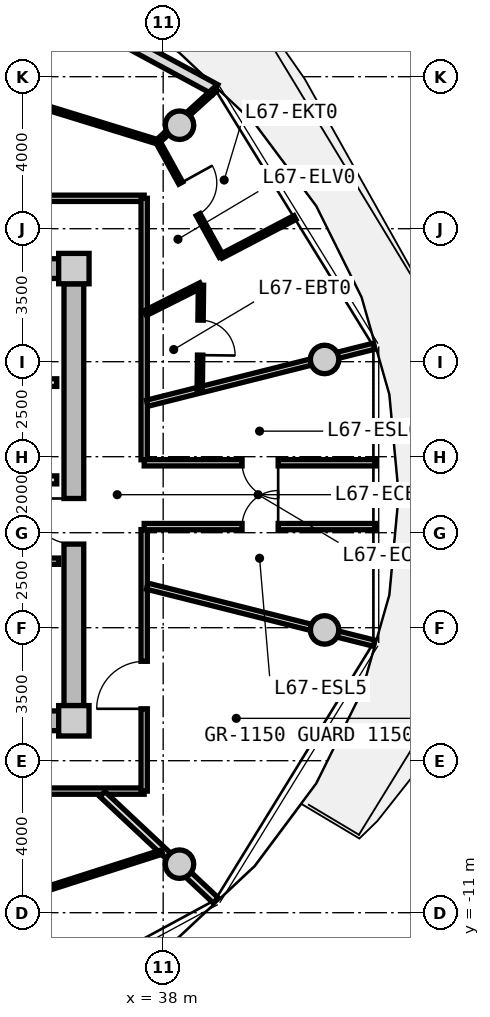
"""IFC4 building model, lengths in metres.
Left out: names, types, materials, properties, quantities, classifications, styles, units other than length and angle.
Written with IfcOpenShell. Run it as: python <this file> out.ifc"""

import sys

from ifc_helpers import new_model, si_unit, direction, frame, frame_2d, origin, origin_2d, place, context, subcontext, project, spatial, rectangle, circle, extrude, source, transform, mapped, element, fill, save


model = new_model("IFC4")
c1 = context("Model", 3, precision=1e-05, world=origin(), true_north=direction((0.0, 1.0)))
c2 = subcontext(c1, "Body", "Model", "MODEL_VIEW")
j1 = project(units=[si_unit("LENGTHUNIT", "METRE"), si_unit("PLANEANGLEUNIT", "RADIAN")], contexts=[c1])
p1 = place(None, origin())
s1 = spatial("IfcSite", under=j1, at=p1, CompositionType="ELEMENT")
p2 = place(p1, origin())
s2 = spatial("IfcBuilding", under=s1, at=p2, CompositionType="ELEMENT")
p3 = place(p2, frame((0.0, 0.0, 216.95)))
s3 = spatial("IfcBuildingStorey", under=s2, at=p3, CompositionType="ELEMENT", Elevation=216.95)
m1 = source(origin(), c2, "Body", "SweptSolid", [
    extrude(rectangle(XDim=0.8, YDim=0.8, at=origin_2d()), origin(), (0.0, 0.0, 1.0), 3.05),
])
for number, where, z_axis, x_axis in (
    (1, (35.65, -5.95, 0.0), (0.0, 0.0, 1.0), (1.0, 0.0, 0.0)),
    (2, (35.65, 5.95, 0.0), (0.0, 0.0, 1.0), (1.0, 0.0, 0.0)),
):
    element("IfcColumn", number, at=place(p3, frame(where, z_axis=z_axis, x_axis=x_axis)), inside=s3, PredefinedType="COLUMN", context=c2, shape_type="MappedRepresentation", body=[
        mapped(m1, transform((0.0, 0.0, 0.0), x_axis=(1.0, 0.0, 0.0), y_axis=(0.0, 1.0, 0.0), z_axis=(0.0, 0.0, 1.0), scale=1.0)),
    ])
m2 = source(origin(), c2, "Body", "SweptSolid", [
    extrude(rectangle(XDim=14.5, YDim=0.52, at=frame_2d((7.25, 0.0))), origin(), (0.0, 0.0, 1.0), 2.76),
])
for number, where, z_axis, x_axis in (
    (3, (20.75, 5.95, 0.0), (0.0, 0.0, 1.0), (1.0, 0.0, 0.0)),
    (4, (35.25, -5.95, 0.0), (0.0, 0.0, 1.0), (-1.0, 0.0, 0.0)),
):
    element("IfcWall", number, at=place(p3, frame(where, z_axis=z_axis, x_axis=x_axis)), inside=s3, PredefinedType="SHEAR", context=c2, shape_type="MappedRepresentation", body=[
        mapped(m2, transform((0.0, 0.0, 0.0), x_axis=(1.0, 0.0, 0.0), y_axis=(0.0, 1.0, 0.0), z_axis=(0.0, 0.0, 1.0), scale=1.0)),
    ])
m3 = source(origin(), c2, "Body", "SweptSolid", [
    extrude(rectangle(XDim=11.1, YDim=0.52, at=frame_2d((5.55, 0.0))), origin(), (0.0, 0.0, 1.0), 2.76),
])
p4 = place(p3, frame((35.65, 5.55, 0.0), z_axis=(0.0, 0.0, 1.0), x_axis=(0.0, -1.0, 0.0)))
e5 = element("IfcWall", 5, at=p4, inside=s3, PredefinedType="SHEAR", context=c2, shape_type="MappedRepresentation", body=[
    mapped(m3, transform((0.0, 0.0, 0.0), x_axis=(1.0, 0.0, 0.0), y_axis=(0.0, 1.0, 0.0), z_axis=(0.0, 0.0, 1.0), scale=1.0)),
])
p5 = place(p4, frame((5.65, 0.0, 0.0)))
e6 = element("IfcOpeningElement", 6, at=p5, cuts=e5, PredefinedType="OPENING", context=c2, shape_type="SweptSolid", body=[
    extrude(rectangle(XDim=1.2, YDim=2.15, at=frame_2d((0.6, 1.075))), frame((0.0, 0.27, 0.0), z_axis=(0.0, -1.0, 0.0), x_axis=(1.0, 0.0, 0.0)), (0.0, 0.0, 1.0), 0.54),
])
m4 = source(origin(), c2, "Body", "SweptSolid", [
    extrude(circle(Radius=0.375, at=origin_2d()), origin(), (0.0, 0.0, 1.0), 3.05),
])
for number, where, z_axis, x_axis in (
    (7, (42.247, 3.559, 0.0), (0.0, 0.0, 1.0), (1.0, 0.0, 0.0)),
    (8, (38.43, 9.723, 0.0), (0.0, 0.0, 1.0), (1.0, 0.0, 0.0)),
    (9, (38.43, -9.723, 0.0), (0.0, 0.0, 1.0), (1.0, 0.0, 0.0)),
    (10, (42.247, -3.559, 0.0), (0.0, 0.0, 1.0), (1.0, 0.0, 0.0)),
):
    element("IfcColumn", number, at=place(p3, frame(where, z_axis=z_axis, x_axis=x_axis)), inside=s3, PredefinedType="COLUMN", context=c2, shape_type="MappedRepresentation", body=[
        mapped(m4, transform((0.0, 0.0, 0.0), x_axis=(1.0, 0.0, 0.0), y_axis=(0.0, 1.0, 0.0), z_axis=(0.0, 0.0, 1.0), scale=1.0)),
    ])
m5 = source(origin(), c2, "Body", "SweptSolid", [
    extrude(rectangle(XDim=8.197, YDim=0.29, at=frame_2d((4.099, 0.0))), origin(), (0.0, 0.0, 1.0), 2.76),
])
p6 = place(p3, frame((32.162, 14.566, 0.0), z_axis=(0.0, 0.0, 1.0), x_axis=(0.879369910001, -0.476139224791, 0.0)))
e11 = element("IfcWall", 11, at=p6, inside=s3, PredefinedType="SOLIDWALL", context=c2, shape_type="MappedRepresentation", body=[
    mapped(m5, transform((0.0, 0.0, 0.0), x_axis=(1.0, 0.0, 0.0), y_axis=(0.0, 1.0, 0.0), z_axis=(0.0, 0.0, 1.0), scale=1.0)),
])
p7 = place(p6, frame((0.9, 0.0, 0.0)))
e12 = element("IfcOpeningElement", 12, at=p7, cuts=e11, PredefinedType="OPENING", context=c2, shape_type="SweptSolid", body=[
    extrude(rectangle(XDim=1.15, YDim=2.25, at=frame_2d((0.575, 1.125))), frame((0.0, 0.155, 0.0), z_axis=(0.0, -1.0, 0.0), x_axis=(1.0, 0.0, 0.0)), (0.0, 0.0, 1.0), 0.31),
])
p8 = place(p6, frame((4.448, 0.0, 0.85)))
e13 = element("IfcOpeningElement", 13, at=p8, cuts=e11, PredefinedType="OPENING", context=c2, shape_type="SweptSolid", body=[
    extrude(rectangle(XDim=1.2, YDim=1.5, at=frame_2d((0.6, 0.75))), frame((0.0, 0.155, 0.0), z_axis=(0.0, -1.0, 0.0), x_axis=(1.0, 0.0, 0.0)), (0.0, 0.0, 1.0), 0.31),
])
m6 = source(origin(), c2, "Body", "SweptSolid", [
    extrude(rectangle(XDim=3.2, YDim=0.2, at=frame_2d((1.6, 0.0))), origin(), (0.0, 0.0, 1.0), 2.745),
])
p9 = place(p3, frame((32.0, 2.95, 0.0), z_axis=(0.0, 0.0, 1.0), x_axis=(1.0, 0.0, 0.0)))
e14 = element("IfcWall", 14, at=p9, inside=s3, PredefinedType="PARTITIONING", context=c2, shape_type="MappedRepresentation", body=[
    mapped(m6, transform((0.0, 0.0, 0.0), x_axis=(1.0, 0.0, 0.0), y_axis=(0.0, 1.0, 0.0), z_axis=(0.0, 0.0, 1.0), scale=1.0)),
])
m7 = source(origin(), c2, "Body", "SweptSolid", [
    extrude(rectangle(XDim=6.66, YDim=0.21, at=frame_2d((3.33, 0.0))), origin(), (0.0, 0.0, 1.0), 2.745),
])
p10 = place(p3, frame((28.54, 0.39, 0.0), z_axis=(0.0, 0.0, 1.0), x_axis=(1.0, 0.0, 0.0)))
e15 = element("IfcWall", 15, at=p10, inside=s3, PredefinedType="PARTITIONING", context=c2, shape_type="MappedRepresentation", body=[
    mapped(m7, transform((0.0, 0.0, 0.0), x_axis=(1.0, 0.0, 0.0), y_axis=(0.0, 1.0, 0.0), z_axis=(0.0, 0.0, 1.0), scale=1.0)),
])
p11 = place(p10, frame((1.0, 0.0, 0.0)))
e16 = element("IfcOpeningElement", 16, at=p11, cuts=e15, PredefinedType="OPENING", context=c2, shape_type="SweptSolid", body=[
    extrude(rectangle(XDim=1.2, YDim=2.15, at=frame_2d((0.6, 1.075))), frame((0.0, 0.115, 0.0), z_axis=(0.0, -1.0, 0.0), x_axis=(1.0, 0.0, 0.0)), (0.0, 0.0, 1.0), 0.23),
])
m8 = source(origin(), c2, "Body", "SweptSolid", [
    extrude(rectangle(XDim=2.7, YDim=0.165, at=frame_2d((1.35, 0.0))), origin(), (0.0, 0.0, 1.0), 2.745),
])
p12 = place(p3, frame((32.55, -1.75, 0.0), z_axis=(0.0, 0.0, 1.0), x_axis=(1.0, 0.0, 0.0)))
e17 = element("IfcWall", 17, at=p12, inside=s3, PredefinedType="PARTITIONING", context=c2, shape_type="MappedRepresentation", body=[
    mapped(m8, transform((0.0, 0.0, 0.0), x_axis=(1.0, 0.0, 0.0), y_axis=(0.0, 1.0, 0.0), z_axis=(0.0, 0.0, 1.0), scale=1.0)),
])
p13 = place(p12, frame((0.85, 0.0, 0.0)))
e18 = element("IfcOpeningElement", 18, at=p13, cuts=e17, PredefinedType="OPENING", context=c2, shape_type="SweptSolid", body=[
    extrude(rectangle(XDim=0.925, YDim=2.1, at=frame_2d((0.462, 1.05))), frame((0.0, 0.093, 0.0), z_axis=(0.0, -1.0, 0.0), x_axis=(1.0, 0.0, 0.0)), (0.0, 0.0, 1.0), 0.185),
])
m9 = source(origin(), c2, "Body", "SweptSolid", [
    extrude(rectangle(XDim=8.58, YDim=0.165, at=frame_2d((4.29, 0.0))), origin(), (0.0, 0.0, 1.0), 2.745),
])
p14 = place(p3, frame((28.92, 7.8, 0.0), z_axis=(0.0, 0.0, 1.0), x_axis=(1.0, 0.0, 0.0)))
e19 = element("IfcWall", 19, at=p14, inside=s3, PredefinedType="PARTITIONING", context=c2, shape_type="MappedRepresentation", body=[
    mapped(m9, transform((0.0, 0.0, 0.0), x_axis=(1.0, 0.0, 0.0), y_axis=(0.0, 1.0, 0.0), z_axis=(0.0, 0.0, 1.0), scale=1.0)),
])
p15 = place(p14, frame((4.32, 0.0, 0.0)))
e20 = element("IfcOpeningElement", 20, at=p15, cuts=e19, PredefinedType="OPENING", context=c2, shape_type="SweptSolid", body=[
    extrude(rectangle(XDim=1.05, YDim=2.15, at=frame_2d((0.525, 1.075))), frame((0.0, 0.093, 0.0), z_axis=(0.0, -1.0, 0.0), x_axis=(1.0, 0.0, 0.0)), (0.0, 0.0, 1.0), 0.185),
])
m10 = source(origin(), c2, "Body", "SweptSolid", [
    extrude(rectangle(XDim=19.0, YDim=0.165, at=frame_2d((9.5, 0.0))), origin(), (0.0, 0.0, 1.0), 2.745),
])
p16 = place(p3, frame((37.5, -7.8, 0.0), z_axis=(0.0, 0.0, 1.0), x_axis=(-1.0, 0.0, 0.0)))
e21 = element("IfcWall", 21, at=p16, inside=s3, PredefinedType="PARTITIONING", context=c2, shape_type="MappedRepresentation", body=[
    mapped(m10, transform((0.0, 0.0, 0.0), x_axis=(1.0, 0.0, 0.0), y_axis=(0.0, 1.0, 0.0), z_axis=(0.0, 0.0, 1.0), scale=1.0)),
])
p17 = place(p16, frame((9.392, 0.0, 0.0)))
e22 = element("IfcOpeningElement", 22, at=p17, cuts=e21, PredefinedType="OPENING", context=c2, shape_type="SweptSolid", body=[
    extrude(rectangle(XDim=1.05, YDim=2.15, at=frame_2d((0.525, 1.075))), frame((0.0, 0.093, 0.0), z_axis=(0.0, -1.0, 0.0), x_axis=(1.0, 0.0, 0.0)), (0.0, 0.0, 1.0), 0.185),
])
m11 = source(origin(), c2, "Body", "SweptSolid", [
    extrude(rectangle(XDim=6.88, YDim=0.165, at=frame_2d((3.44, 0.0))), origin(), (0.0, 0.0, 1.0), 2.745),
])
p18 = place(p3, frame((37.5, 7.8, 0.0), z_axis=(0.0, 0.0, 1.0), x_axis=(0.0, -1.0, 0.0)))
e23 = element("IfcWall", 23, at=p18, inside=s3, PredefinedType="PARTITIONING", context=c2, shape_type="MappedRepresentation", body=[
    mapped(m11, transform((0.0, 0.0, 0.0), x_axis=(1.0, 0.0, 0.0), y_axis=(0.0, 1.0, 0.0), z_axis=(0.0, 0.0, 1.0), scale=1.0)),
])
p19 = place(p3, frame((37.5, -0.92, 0.0), z_axis=(0.0, 0.0, 1.0), x_axis=(0.0, -1.0, 0.0)))
e24 = element("IfcWall", 24, at=p19, inside=s3, PredefinedType="PARTITIONING", context=c2, shape_type="MappedRepresentation", body=[
    mapped(m11, transform((0.0, 0.0, 0.0), x_axis=(1.0, 0.0, 0.0), y_axis=(0.0, 1.0, 0.0), z_axis=(0.0, 0.0, 1.0), scale=1.0)),
])
p20 = place(p19, frame((3.464, 0.0, 0.0)))
e25 = element("IfcOpeningElement", 25, at=p20, cuts=e24, PredefinedType="OPENING", context=c2, shape_type="SweptSolid", body=[
    extrude(rectangle(XDim=1.25, YDim=2.2, at=frame_2d((0.625, 1.1))), frame((0.0, 0.093, 0.0), z_axis=(0.0, -1.0, 0.0), x_axis=(1.0, 0.0, 0.0)), (0.0, 0.0, 1.0), 0.185),
])
m12 = source(origin(), c2, "Body", "SweptSolid", [
    extrude(rectangle(XDim=6.157, YDim=0.165, at=frame_2d((3.079, 0.0))), origin(), (0.0, 0.0, 1.0), 2.345),
])
for number, where, z_axis, x_axis in (
    (26, (37.58, -2.407, 0.0), (0.0, 0.0, 1.0), (0.97, -0.244, 0.0)),
    (27, (37.58, 2.407, 0.0), (0.0, 0.0, 1.0), (0.97, 0.244, 0.0)),
):
    element("IfcWall", number, at=place(p3, frame(where, z_axis=z_axis, x_axis=x_axis)), inside=s3, PredefinedType="PARTITIONING", context=c2, shape_type="MappedRepresentation", body=[
        mapped(m12, transform((0.0, 0.0, 0.0), x_axis=(1.0, 0.0, 0.0), y_axis=(0.0, 1.0, 0.0), z_axis=(0.0, 0.0, 1.0), scale=1.0)),
    ])
m13 = source(origin(), c2, "Body", "SweptSolid", [
    extrude(rectangle(XDim=6.101, YDim=0.165, at=frame_2d((3.051, 0.0))), origin(), (0.0, 0.0, 1.0), 2.745),
])
p21 = place(p3, frame((37.5, 0.84, 0.0), z_axis=(0.0, 0.0, 1.0), x_axis=(1.0, 0.0, 0.0)))
e28 = element("IfcWall", 28, at=p21, inside=s3, PredefinedType="PARTITIONING", context=c2, shape_type="MappedRepresentation", body=[
    mapped(m13, transform((0.0, 0.0, 0.0), x_axis=(1.0, 0.0, 0.0), y_axis=(0.0, 1.0, 0.0), z_axis=(0.0, 0.0, 1.0), scale=1.0)),
])
p22 = place(p21, frame((2.576, 0.0, 0.0)))
e29 = element("IfcOpeningElement", 29, at=p22, cuts=e28, PredefinedType="OPENING", context=c2, shape_type="SweptSolid", body=[
    extrude(rectangle(XDim=0.95, YDim=2.1, at=frame_2d((0.475, 1.05))), frame((0.0, 0.093, 0.0), z_axis=(0.0, -1.0, 0.0), x_axis=(1.0, 0.0, 0.0)), (0.0, 0.0, 1.0), 0.185),
])
p23 = place(p3, frame((43.601, -0.84, 0.0), z_axis=(0.0, 0.0, 1.0), x_axis=(-1.0, 0.0, 0.0)))
e30 = element("IfcWall", 30, at=p23, inside=s3, PredefinedType="PARTITIONING", context=c2, shape_type="MappedRepresentation", body=[
    mapped(m13, transform((0.0, 0.0, 0.0), x_axis=(1.0, 0.0, 0.0), y_axis=(0.0, 1.0, 0.0), z_axis=(0.0, 0.0, 1.0), scale=1.0)),
])
p24 = place(p23, frame((2.576, 0.0, 0.0)))
e31 = element("IfcOpeningElement", 31, at=p24, cuts=e30, PredefinedType="OPENING", context=c2, shape_type="SweptSolid", body=[
    extrude(rectangle(XDim=0.95, YDim=2.1, at=frame_2d((0.475, 1.05))), frame((0.0, 0.093, 0.0), z_axis=(0.0, -1.0, 0.0), x_axis=(1.0, 0.0, 0.0)), (0.0, 0.0, 1.0), 0.185),
])
m14 = source(origin(), c2, "Body", "SweptSolid", [
    extrude(rectangle(XDim=6.919, YDim=0.115, at=frame_2d((3.459, 0.0))), origin(), (0.0, 0.0, 1.0), 2.745),
])
p25 = place(p3, frame((37.849, 9.287, 0.0), z_axis=(0.0, 0.0, 1.0), x_axis=(-0.955678249072, 0.294413118341, 0.0)))
e32 = element("IfcWall", 32, at=p25, inside=s3, PredefinedType="PARTITIONING", context=c2, shape_type="MappedRepresentation", body=[
    mapped(m14, transform((0.0, 0.0, 0.0), x_axis=(1.0, 0.0, 0.0), y_axis=(0.0, 1.0, 0.0), z_axis=(0.0, 0.0, 1.0), scale=1.0)),
])
p26 = place(p25, frame((2.985, 0.0, 0.0)))
e33 = element("IfcOpeningElement", 33, at=p26, cuts=e32, PredefinedType="OPENING", context=c2, shape_type="SweptSolid", body=[
    extrude(rectangle(XDim=0.95, YDim=2.1, at=frame_2d((0.475, 1.05))), frame((0.0, 0.067, 0.0), z_axis=(0.0, -1.0, 0.0), x_axis=(1.0, 0.0, 0.0)), (0.0, 0.0, 1.0), 0.135),
])
m15 = source(origin(), c2, "Body", "SweptSolid", [
    extrude(rectangle(XDim=2.072, YDim=0.115, at=frame_2d((1.036, 0.0))), origin(), (0.0, 0.0, 1.0), 2.345),
])
p27 = place(p3, frame((37.849, 9.287, 0.0), z_axis=(0.0, 0.0, 1.0), x_axis=(0.741410125356, 0.671052178314, 0.0)))
e34 = element("IfcWall", 34, at=p27, inside=s3, PredefinedType="PARTITIONING", context=c2, shape_type="MappedRepresentation", body=[
    mapped(m15, transform((0.0, 0.0, 0.0), x_axis=(1.0, 0.0, 0.0), y_axis=(0.0, 1.0, 0.0), z_axis=(0.0, 0.0, 1.0), scale=1.0)),
])
m16 = source(origin(), c2, "Body", "SweptSolid", [
    extrude(rectangle(XDim=1.638, YDim=0.14, at=frame_2d((0.819, 0.0))), origin(), (0.0, 0.0, 1.0), 2.745),
])
p28 = place(p3, frame((37.53, 4.778, 0.0), z_axis=(0.0, 0.0, 1.0), x_axis=(0.893919977945, 0.448226586707, 0.0)))
e35 = element("IfcWall", 35, at=p28, inside=s3, PredefinedType="PARTITIONING", context=c2, shape_type="MappedRepresentation", body=[
    mapped(m16, transform((0.0, 0.0, 0.0), x_axis=(1.0, 0.0, 0.0), y_axis=(0.0, 1.0, 0.0), z_axis=(0.0, 0.0, 1.0), scale=1.0)),
])
m17 = source(origin(), c2, "Body", "SweptSolid", [
    extrude(rectangle(XDim=2.759, YDim=0.14, at=frame_2d((1.379, 0.0))), origin(), (0.0, 0.0, 1.0), 2.745),
])
p29 = place(p3, frame((38.995, 5.513, 0.0), z_axis=(0.0, 0.0, 1.0), x_axis=(-0.01194710728, -0.999928630767, 0.0)))
e36 = element("IfcWall", 36, at=p29, inside=s3, PredefinedType="PARTITIONING", context=c2, shape_type="MappedRepresentation", body=[
    mapped(m17, transform((0.0, 0.0, 0.0), x_axis=(1.0, 0.0, 0.0), y_axis=(0.0, 1.0, 0.0), z_axis=(0.0, 0.0, 1.0), scale=1.0)),
])
p30 = place(p29, frame((0.919, 0.0, 0.0)))
e37 = element("IfcOpeningElement", 37, at=p30, cuts=e36, PredefinedType="OPENING", context=c2, shape_type="SweptSolid", body=[
    extrude(rectangle(XDim=0.92, YDim=2.1, at=frame_2d((0.46, 1.05))), frame((0.0, 0.08, 0.0), z_axis=(0.0, -1.0, 0.0), x_axis=(1.0, 0.0, 0.0)), (0.0, 0.0, 1.0), 0.16),
])
m18 = source(origin(), c2, "Body", "SweptSolid", [
    extrude(rectangle(XDim=2.193, YDim=0.115, at=frame_2d((1.097, 0.0))), origin(), (0.0, 0.0, 1.0), 2.745),
])
p31 = place(p3, frame((39.525, 6.275, 0.0), z_axis=(0.0, 0.0, 1.0), x_axis=(0.885783595046, 0.464098505435, 0.0)))
e38 = element("IfcWall", 38, at=p31, inside=s3, PredefinedType="PARTITIONING", context=c2, shape_type="MappedRepresentation", body=[
    mapped(m18, transform((0.0, 0.0, 0.0), x_axis=(1.0, 0.0, 0.0), y_axis=(0.0, 1.0, 0.0), z_axis=(0.0, 0.0, 1.0), scale=1.0)),
])
m19 = source(origin(), c2, "Body", "SweptSolid", [
    extrude(rectangle(XDim=3.45, YDim=0.115, at=frame_2d((1.725, 0.0))), origin(), (0.0, 0.0, 1.0), 2.745),
])
p32 = place(p3, frame((39.525, 6.275, 0.0), z_axis=(0.0, 0.0, 1.0), x_axis=(-0.483659007882, 0.875256513312, 0.0)))
e39 = element("IfcWall", 39, at=p32, inside=s3, PredefinedType="PARTITIONING", context=c2, shape_type="MappedRepresentation", body=[
    mapped(m19, transform((0.0, 0.0, 0.0), x_axis=(1.0, 0.0, 0.0), y_axis=(0.0, 1.0, 0.0), z_axis=(0.0, 0.0, 1.0), scale=1.0)),
])
p33 = place(p32, frame((1.25, 0.0, 0.0)))
e40 = element("IfcOpeningElement", 40, at=p33, cuts=e39, PredefinedType="OPENING", context=c2, shape_type="SweptSolid", body=[
    extrude(rectangle(XDim=0.95, YDim=2.1, at=frame_2d((0.475, 1.05))), frame((0.0, 0.067, 0.0), z_axis=(0.0, -1.0, 0.0), x_axis=(1.0, 0.0, 0.0)), (0.0, 0.0, 1.0), 0.135),
])
m20 = source(origin(), c2, "Body", "SweptSolid", [
    extrude(rectangle(XDim=4.089, YDim=0.19, at=frame_2d((2.044, 0.0))), origin(), (0.0, 0.0, 1.0), 2.345),
])
p34 = place(p3, frame((36.402, -7.88, 0.0), z_axis=(0.0, 0.0, 1.0), x_axis=(0.729401273609, -0.684086092577, 0.0)))
e41 = element("IfcWall", 41, at=p34, inside=s3, PredefinedType="PARTITIONING", context=c2, shape_type="MappedRepresentation", body=[
    mapped(m20, transform((0.0, 0.0, 0.0), x_axis=(1.0, 0.0, 0.0), y_axis=(0.0, 1.0, 0.0), z_axis=(0.0, 0.0, 1.0), scale=1.0)),
])
m21 = source(origin(), c2, "Body", "SweptSolid", [
    extrude(rectangle(XDim=7.024, YDim=0.115, at=frame_2d((3.512, 0.0))), origin(), (0.0, 0.0, 1.0), 2.745),
])
p35 = place(p3, frame((31.28, -11.542, 0.0), z_axis=(0.0, 0.0, 1.0), x_axis=(0.952454006655, 0.304682400552, 0.0)))
e42 = element("IfcWall", 42, at=p35, inside=s3, PredefinedType="PARTITIONING", context=c2, shape_type="MappedRepresentation", body=[
    mapped(m21, transform((0.0, 0.0, 0.0), x_axis=(1.0, 0.0, 0.0), y_axis=(0.0, 1.0, 0.0), z_axis=(0.0, 0.0, 1.0), scale=1.0)),
])
p36 = place(p35, frame((3.037, 0.0, 0.0)))
e43 = element("IfcOpeningElement", 43, at=p36, cuts=e42, PredefinedType="OPENING", context=c2, shape_type="SweptSolid", body=[
    extrude(rectangle(XDim=0.95, YDim=2.1, at=frame_2d((0.475, 1.05))), frame((0.0, 0.067, 0.0), z_axis=(0.0, -1.0, 0.0), x_axis=(1.0, 0.0, 0.0)), (0.0, 0.0, 1.0), 0.135),
])
m22 = source(origin(), c2, "Body", "SweptSolid", [
    extrude(rectangle(XDim=1.2, YDim=2.15, at=frame_2d((0.6, 1.075))), frame((0.0, 0.025, 0.0), z_axis=(0.0, -1.0, 0.0), x_axis=(1.0, 0.0, 0.0)), (0.0, 0.0, 1.0), 0.05),
])
p37 = place(p5, frame((1.2, 0.0, 0.0), z_axis=(0.0, 0.0, 1.0), x_axis=(-1.0, 0.0, 0.0)))
e44 = element("IfcDoor", 44, at=p37, inside=s3, OperationType="SINGLE_SWING_RIGHT", PredefinedType="DOOR", context=c2, shape_type="MappedRepresentation", body=[
    mapped(m22, transform((0.0, 0.0, 0.0), x_axis=(1.0, 0.0, 0.0), y_axis=(0.0, 1.0, 0.0), z_axis=(0.0, 0.0, 1.0), scale=1.0)),
])
fill(e6, e44)
m23 = source(origin(), c2, "Body", "SweptSolid", [
    extrude(rectangle(XDim=0.95, YDim=2.1, at=frame_2d((0.475, 1.05))), frame((0.0, 0.025, 0.0), z_axis=(0.0, -1.0, 0.0), x_axis=(1.0, 0.0, 0.0)), (0.0, 0.0, 1.0), 0.05),
])
p38 = place(p24, frame((0.95, 0.0, 0.0), z_axis=(0.0, 0.0, 1.0), x_axis=(-1.0, 0.0, 0.0)))
e45 = element("IfcDoor", 45, at=p38, inside=s3, OperationType="SINGLE_SWING_RIGHT", PredefinedType="DOOR", context=c2, shape_type="MappedRepresentation", body=[
    mapped(m23, transform((0.0, 0.0, 0.0), x_axis=(1.0, 0.0, 0.0), y_axis=(0.0, 1.0, 0.0), z_axis=(0.0, 0.0, 1.0), scale=1.0)),
])
fill(e31, e45)
p39 = place(p22, frame((0.95, 0.0, 0.0), z_axis=(0.0, 0.0, 1.0), x_axis=(-1.0, 0.0, 0.0)))
e46 = element("IfcDoor", 46, at=p39, inside=s3, OperationType="SINGLE_SWING_LEFT", PredefinedType="DOOR", context=c2, shape_type="MappedRepresentation", body=[
    mapped(m23, transform((0.0, 0.0, 0.0), x_axis=(1.0, 0.0, 0.0), y_axis=(0.0, 1.0, 0.0), z_axis=(0.0, 0.0, 1.0), scale=1.0)),
])
fill(e29, e46)
m24 = source(origin(), c2, "Body", "SweptSolid", [
    extrude(rectangle(XDim=0.92, YDim=2.1, at=frame_2d((0.46, 1.05))), frame((0.0, 0.025, 0.0), z_axis=(0.0, -1.0, 0.0), x_axis=(1.0, 0.0, 0.0)), (0.0, 0.0, 1.0), 0.05),
])
p40 = place(p30, origin())
e47 = element("IfcDoor", 47, at=p40, inside=s3, OperationType="SINGLE_SWING_RIGHT", PredefinedType="DOOR", context=c2, shape_type="MappedRepresentation", body=[
    mapped(m24, transform((0.0, 0.0, 0.0), x_axis=(1.0, 0.0, 0.0), y_axis=(0.0, 1.0, 0.0), z_axis=(0.0, 0.0, 1.0), scale=1.0)),
])
fill(e37, e47)
p41 = place(p33, frame((0.95, 0.0, 0.0), z_axis=(0.0, 0.0, 1.0), x_axis=(-1.0, 0.0, 0.0)))
e48 = element("IfcDoor", 48, at=p41, inside=s3, OperationType="SINGLE_SWING_LEFT", PredefinedType="DOOR", context=c2, shape_type="MappedRepresentation", body=[
    mapped(m23, transform((0.0, 0.0, 0.0), x_axis=(1.0, 0.0, 0.0), y_axis=(0.0, 1.0, 0.0), z_axis=(0.0, 0.0, 1.0), scale=1.0)),
])
fill(e40, e48)
p42 = place(p36, origin())
e49 = element("IfcDoor", 49, at=p42, inside=s3, OperationType="SINGLE_SWING_RIGHT", PredefinedType="DOOR", context=c2, shape_type="MappedRepresentation", body=[
    mapped(m23, transform((0.0, 0.0, 0.0), x_axis=(1.0, 0.0, 0.0), y_axis=(0.0, 1.0, 0.0), z_axis=(0.0, 0.0, 1.0), scale=1.0)),
])
fill(e43, e49)
m25 = source(origin(), c2, "Body", "SweptSolid", [
    extrude(rectangle(XDim=1.25, YDim=2.2, at=frame_2d((0.625, 1.1))), frame((0.0, 0.025, 0.0), z_axis=(0.0, -1.0, 0.0), x_axis=(1.0, 0.0, 0.0)), (0.0, 0.0, 1.0), 0.05),
])
p43 = place(p20, frame((1.25, 0.0, 0.0), z_axis=(0.0, 0.0, 1.0), x_axis=(-1.0, 0.0, 0.0)))
e50 = element("IfcDoor", 50, at=p43, inside=s3, OperationType="SINGLE_SWING_LEFT", PredefinedType="DOOR", context=c2, shape_type="MappedRepresentation", body=[
    mapped(m25, transform((0.0, 0.0, 0.0), x_axis=(1.0, 0.0, 0.0), y_axis=(0.0, 1.0, 0.0), z_axis=(0.0, 0.0, 1.0), scale=1.0)),
])
fill(e25, e50)
save(model, sys.argv[1])
